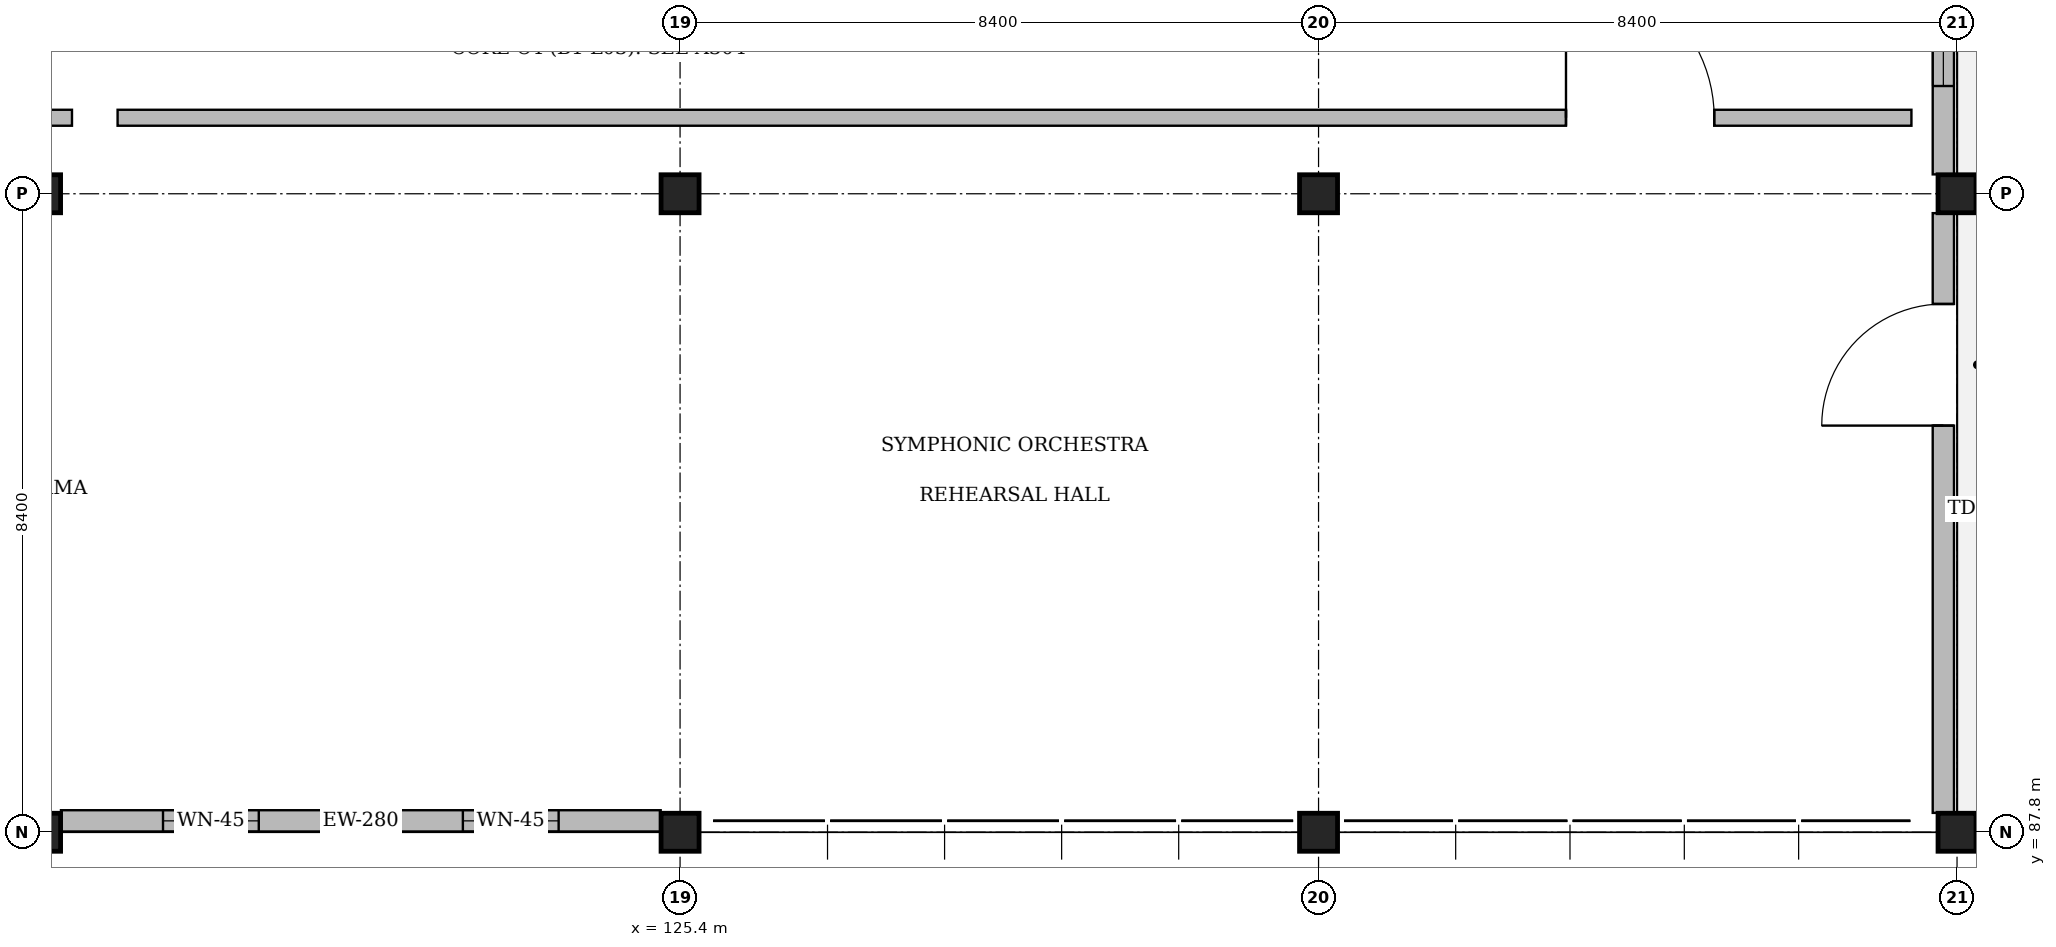
"""IFC4 building model, lengths in metres.
Left out: names, types, materials, properties, quantities, classifications, styles, units other than length and angle.
Written with IfcOpenShell. Run it as: python <this file> out.ifc"""

import sys

from ifc_helpers import new_model, si_unit, direction, frame, frame_2d, origin, origin_2d, place, context, subcontext, project, spatial, rectangle, extrude, element, fill, save


model = new_model("IFC4")
c1 = context("Model", 3, precision=1e-05, world=origin(), true_north=direction((0.0, 1.0)))
c2 = subcontext(c1, "Body", "Model", "MODEL_VIEW")
j1 = project(units=[si_unit("LENGTHUNIT", "METRE"), si_unit("PLANEANGLEUNIT", "RADIAN")], contexts=[c1])
p1 = place(None, origin())
s1 = spatial("IfcSite", under=j1, at=p1, CompositionType="ELEMENT")
p2 = place(p1, origin())
s2 = spatial("IfcBuilding", under=s1, at=p2, CompositionType="ELEMENT")
p3 = place(p2, frame((0.0, 0.0, 13.2)))
s3 = spatial("IfcBuildingStorey", under=s2, at=p3, CompositionType="ELEMENT", Elevation=13.2)
for number, where, z_axis, x_axis in (
    (1, (117.0, 87.8, 0.0), (0.0, 0.0, 1.0), (1.0, 0.0, 0.0)),
    (2, (117.0, 96.2, 0.0), (0.0, 0.0, 1.0), (1.0, 0.0, 0.0)),
    (3, (125.4, 87.8, 0.0), (0.0, 0.0, 1.0), (1.0, 0.0, 0.0)),
    (4, (125.4, 96.2, 0.0), (0.0, 0.0, 1.0), (1.0, 0.0, 0.0)),
    (5, (133.8, 87.8, 0.0), (0.0, 0.0, 1.0), (1.0, 0.0, 0.0)),
    (6, (133.8, 96.2, 0.0), (0.0, 0.0, 1.0), (1.0, 0.0, 0.0)),
    (7, (142.2, 87.8, 0.0), (0.0, 0.0, 1.0), (1.0, 0.0, 0.0)),
    (8, (142.2, 96.2, 0.0), (0.0, 0.0, 1.0), (1.0, 0.0, 0.0)),
):
    element("IfcColumn", number, at=place(p3, frame(where, z_axis=z_axis, x_axis=x_axis)), inside=s3, PredefinedType="COLUMN", context=c2, shape_type="SweptSolid", body=[
        extrude(rectangle(XDim=0.5, YDim=0.5, at=origin_2d()), origin(), (0.0, 0.0, 1.0), 3.71),
    ])
p4 = place(p3, frame((117.255, 87.95, 0.0), z_axis=(0.0, 0.0, 1.0), x_axis=(1.0, 0.0, 0.0)))
e9 = element("IfcWall", 9, at=p4, inside=s3, PredefinedType="SOLIDWALL", context=c2, shape_type="SweptSolid", body=[
    extrude(rectangle(XDim=7.89, YDim=0.28, at=frame_2d((3.945, 0.0))), origin(), (0.0, 0.0, 1.0), 2.993),
])
p5 = place(p4, frame((1.343, 0.0, 0.95)))
e10 = element("IfcOpeningElement", 10, at=p5, cuts=e9, PredefinedType="OPENING", context=c2, shape_type="SweptSolid", body=[
    extrude(rectangle(XDim=1.26, YDim=1.65, at=frame_2d((0.63, 0.825))), frame((0.0, 0.16, 0.0), z_axis=(0.0, -1.0, 0.0), x_axis=(1.0, 0.0, 0.0)), (0.0, 0.0, 1.0), 0.32),
])
p6 = place(p4, frame((5.288, 0.0, 0.95)))
e11 = element("IfcOpeningElement", 11, at=p6, cuts=e9, PredefinedType="OPENING", context=c2, shape_type="SweptSolid", body=[
    extrude(rectangle(XDim=1.26, YDim=1.65, at=frame_2d((0.63, 0.825))), frame((0.0, 0.16, 0.0), z_axis=(0.0, -1.0, 0.0), x_axis=(1.0, 0.0, 0.0)), (0.0, 0.0, 1.0), 0.32),
])
p7 = place(p3, frame((142.02, 88.055, 0.0), z_axis=(0.0, 0.0, 1.0), x_axis=(0.0, 1.0, 0.0)))
e12 = element("IfcWall", 12, at=p7, inside=s3, PredefinedType="SOLIDWALL", context=c2, shape_type="SweptSolid", body=[
    extrude(rectangle(XDim=7.89, YDim=0.28, at=frame_2d((3.945, 0.0))), origin(), (0.0, 0.0, 1.0), 3.243),
])
p8 = place(p7, frame((5.095, 0.0, 0.0)))
e13 = element("IfcOpeningElement", 13, at=p8, cuts=e12, PredefinedType="OPENING", context=c2, shape_type="SweptSolid", body=[
    extrude(rectangle(XDim=1.6, YDim=2.2, at=frame_2d((0.8, 1.1))), frame((0.0, 0.16, 0.0), z_axis=(0.0, -1.0, 0.0), x_axis=(1.0, 0.0, 0.0)), (0.0, 0.0, 1.0), 0.32),
])
p9 = place(p3, frame((142.02, 96.455, 0.0), z_axis=(0.0, 0.0, 1.0), x_axis=(0.0, 1.0, 0.0)))
e14 = element("IfcWall", 14, at=p9, inside=s3, PredefinedType="SOLIDWALL", context=c2, shape_type="SweptSolid", body=[
    extrude(rectangle(XDim=7.29, YDim=0.28, at=frame_2d((3.645, 0.0))), origin(), (0.0, 0.0, 1.0), 3.283),
])
p10 = place(p9, frame((1.163, 0.0, 0.95)))
e15 = element("IfcOpeningElement", 15, at=p10, cuts=e14, PredefinedType="OPENING", context=c2, shape_type="SweptSolid", body=[
    extrude(rectangle(XDim=1.32, YDim=1.65, at=frame_2d((0.66, 0.825))), frame((0.0, 0.16, 0.0), z_axis=(0.0, -1.0, 0.0), x_axis=(1.0, 0.0, 0.0)), (0.0, 0.0, 1.0), 0.32),
])
p11 = place(p9, frame((4.808, 0.0, 0.95)))
e16 = element("IfcOpeningElement", 16, at=p11, cuts=e14, PredefinedType="OPENING", context=c2, shape_type="SweptSolid", body=[
    extrude(rectangle(XDim=1.32, YDim=1.65, at=frame_2d((0.66, 0.825))), frame((0.0, 0.16, 0.0), z_axis=(0.0, -1.0, 0.0), x_axis=(1.0, 0.0, 0.0)), (0.0, 0.0, 1.0), 0.32),
])
p12 = place(p3, frame((114.44, 97.2, 0.0), z_axis=(0.0, 0.0, 1.0), x_axis=(1.0, 0.0, 0.0)))
e17 = element("IfcWall", 17, at=p12, inside=s3, PredefinedType="PARTITIONING", context=c2, shape_type="SweptSolid", body=[
    extrude(rectangle(XDim=2.96, YDim=0.21, at=frame_2d((1.48, 0.0))), origin(), (0.0, 0.0, 1.0), 3.66),
])
p13 = place(p3, frame((118.0, 97.2, 0.0), z_axis=(0.0, 0.0, 1.0), x_axis=(1.0, 0.0, 0.0)))
e18 = element("IfcWall", 18, at=p13, inside=s3, PredefinedType="PARTITIONING", context=c2, shape_type="SweptSolid", body=[
    extrude(rectangle(XDim=23.6, YDim=0.21, at=frame_2d((11.8, 0.0))), origin(), (0.0, 0.0, 1.0), 3.66),
])
p14 = place(p13, frame((19.055, 0.0, 0.0)))
e19 = element("IfcOpeningElement", 19, at=p14, cuts=e18, PredefinedType="OPENING", context=c2, shape_type="SweptSolid", body=[
    extrude(rectangle(XDim=1.95, YDim=2.4, at=frame_2d((0.975, 1.2))), frame((0.0, 0.125, 0.0), z_axis=(0.0, -1.0, 0.0), x_axis=(1.0, 0.0, 0.0)), (0.0, 0.0, 1.0), 0.25),
])
p15 = place(p5, origin())
e20 = element("IfcWindow", 20, at=p15, inside=s3, PartitioningType="SINGLE_PANEL", PredefinedType="WINDOW", context=c2, shape_type="SweptSolid", body=[
    extrude(rectangle(XDim=1.26, YDim=1.65, at=frame_2d((0.63, 0.825))), frame((0.0, 0.03, 0.0), z_axis=(0.0, -1.0, 0.0), x_axis=(1.0, 0.0, 0.0)), (0.0, 0.0, 1.0), 0.06),
])
fill(e10, e20)
p16 = place(p6, origin())
e21 = element("IfcWindow", 21, at=p16, inside=s3, PartitioningType="SINGLE_PANEL", PredefinedType="WINDOW", context=c2, shape_type="SweptSolid", body=[
    extrude(rectangle(XDim=1.26, YDim=1.65, at=frame_2d((0.63, 0.825))), frame((0.0, 0.03, 0.0), z_axis=(0.0, -1.0, 0.0), x_axis=(1.0, 0.0, 0.0)), (0.0, 0.0, 1.0), 0.06),
])
fill(e11, e21)
p17 = place(p8, origin())
e22 = element("IfcDoor", 22, at=p17, inside=s3, OperationType="SINGLE_SWING_LEFT", PredefinedType="DOOR", context=c2, shape_type="SweptSolid", body=[
    extrude(rectangle(XDim=1.6, YDim=2.2, at=frame_2d((0.8, 1.1))), frame((0.0, 0.025, 0.0), z_axis=(0.0, -1.0, 0.0), x_axis=(1.0, 0.0, 0.0)), (0.0, 0.0, 1.0), 0.05),
])
fill(e13, e22)
p18 = place(p10, origin())
e23 = element("IfcWindow", 23, at=p18, inside=s3, PartitioningType="SINGLE_PANEL", PredefinedType="WINDOW", context=c2, shape_type="SweptSolid", body=[
    extrude(rectangle(XDim=1.32, YDim=1.65, at=frame_2d((0.66, 0.825))), frame((0.0, 0.03, 0.0), z_axis=(0.0, -1.0, 0.0), x_axis=(1.0, 0.0, 0.0)), (0.0, 0.0, 1.0), 0.06),
])
fill(e15, e23)
p19 = place(p14, origin())
e24 = element("IfcDoor", 24, at=p19, inside=s3, OperationType="DOUBLE_DOOR_SINGLE_SWING", PredefinedType="DOOR", context=c2, shape_type="SweptSolid", body=[
    extrude(rectangle(XDim=1.95, YDim=2.4, at=frame_2d((0.975, 1.2))), frame((0.0, 0.025, 0.0), z_axis=(0.0, -1.0, 0.0), x_axis=(1.0, 0.0, 0.0)), (0.0, 0.0, 1.0), 0.05),
])
fill(e19, e24)
save(model, sys.argv[1])
